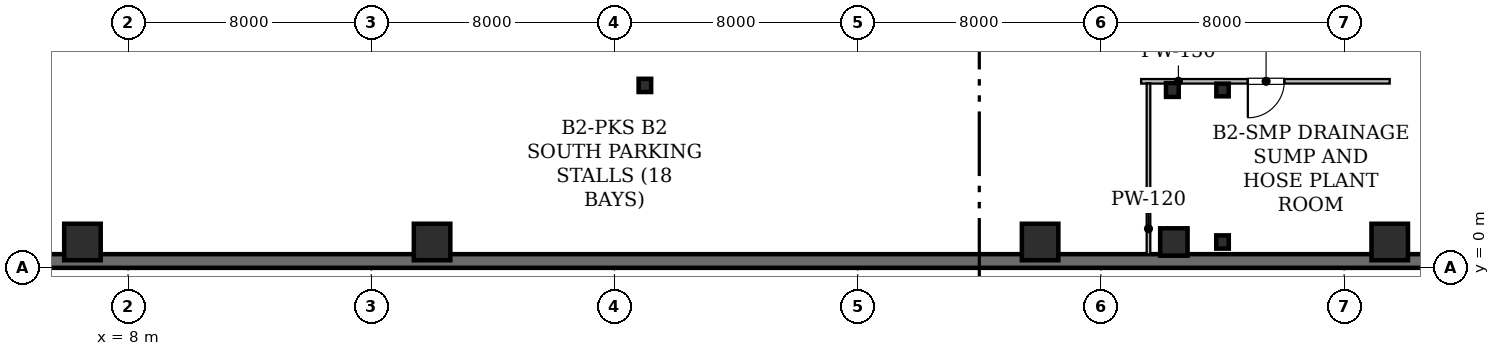
"""IFC4 building model, lengths in metres.
Left out: names, types, materials, properties, quantities, classifications, styles, units other than length and angle.
Written with IfcOpenShell. Run it as: python <this file> out.ifc"""

import sys

from ifc_helpers import new_model, si_unit, direction, frame, frame_2d, origin, origin_2d, place, context, subcontext, project, spatial, rectangle, hollow_rectangle, i_section, extrude, element, fill, save


model = new_model("IFC4")
c1 = context("Model", 3, precision=1e-05, world=origin(), true_north=direction((0.0, 1.0)))
c2 = subcontext(c1, "Body", "Model", "MODEL_VIEW")
j1 = project(units=[si_unit("LENGTHUNIT", "METRE"), si_unit("PLANEANGLEUNIT", "RADIAN")], contexts=[c1])
p1 = place(None, origin())
s1 = spatial("IfcSite", under=j1, at=p1, CompositionType="ELEMENT")
p2 = place(p1, origin())
s2 = spatial("IfcBuilding", under=s1, at=p2, CompositionType="ELEMENT")
p3 = place(p2, frame((0.0, 0.0, -9.0)))
s3 = spatial("IfcBuildingStorey", under=s2, at=p3, CompositionType="ELEMENT", Elevation=-9.0)
for number, where, z_axis, x_axis in (
    (1, (6.5, 0.85, 0.0), (0.0, 0.0, 1.0), (1.0, 0.0, 0.0)),
    (2, (18.0, 0.85, 0.0), (0.0, 0.0, 1.0), (1.0, 0.0, 0.0)),
    (3, (38.0, 0.85, 0.0), (0.0, 0.0, 1.0), (1.0, 0.0, 0.0)),
    (4, (49.5, 0.85, 0.0), (0.0, 0.0, 1.0), (1.0, 0.0, 0.0)),
):
    element("IfcColumn", number, at=place(p3, frame(where, z_axis=z_axis, x_axis=x_axis)), inside=s3, PredefinedType="COLUMN", context=c2, shape_type="SweptSolid", body=[
        extrude(hollow_rectangle(XDim=1.2, YDim=1.2, WallThickness=0.06, at=origin_2d()), origin(), (0.0, 0.0, 1.0), 4.5),
    ])
p4 = place(p3, frame((25.0, 6.0, 0.0), z_axis=(0.0, 0.0, 1.0), x_axis=(1.0, 0.0, 0.0)))
e5 = element("IfcColumn", 5, at=p4, inside=s3, PredefinedType="COLUMN", context=c2, shape_type="SweptSolid", body=[
    extrude(i_section(OverallWidth=0.412, OverallDepth=0.435, WebThickness=0.031, FlangeThickness=0.051, FilletRadius=0.015, at=origin_2d()), origin(), (0.0, 0.0, 1.0), 4.5),
])
p5 = place(p3, frame((42.4, 0.85, 0.0), z_axis=(0.0, 0.0, 1.0), x_axis=(1.0, 0.0, 0.0)))
e6 = element("IfcColumn", 6, at=p5, inside=s3, PredefinedType="COLUMN", context=c2, shape_type="SweptSolid", body=[
    extrude(hollow_rectangle(XDim=0.9, YDim=0.9, WallThickness=0.045, at=origin_2d()), origin(), (0.0, 0.0, 1.0), 4.5),
])
p6 = place(p3, frame((42.35, 5.85, 0.0), z_axis=(0.0, 0.0, 1.0), x_axis=(1.0, 0.0, 0.0)))
e7 = element("IfcColumn", 7, at=p6, inside=s3, PredefinedType="COLUMN", context=c2, shape_type="SweptSolid", body=[
    extrude(i_section(OverallWidth=0.418, OverallDepth=0.455, WebThickness=0.037, FlangeThickness=0.06, FilletRadius=0.015, at=origin_2d()), origin(), (0.0, 0.0, 1.0), 4.5),
])
p7 = place(p3, frame((44.0, 0.85, 0.0), z_axis=(0.0, 0.0, 1.0), x_axis=(1.0, 0.0, 0.0)))
e8 = element("IfcColumn", 8, at=p7, inside=s3, PredefinedType="COLUMN", context=c2, shape_type="SweptSolid", body=[
    extrude(i_section(OverallWidth=0.412, OverallDepth=0.435, WebThickness=0.031, FlangeThickness=0.051, FilletRadius=0.015, at=origin_2d()), origin(), (0.0, 0.0, 1.0), 4.5),
])
p8 = place(p3, frame((44.0, 5.85, 0.0), z_axis=(0.0, 0.0, 1.0), x_axis=(1.0, 0.0, 0.0)))
e9 = element("IfcColumn", 9, at=p8, inside=s3, PredefinedType="COLUMN", context=c2, shape_type="SweptSolid", body=[
    extrude(i_section(OverallWidth=0.406, OverallDepth=0.416, WebThickness=0.026, FlangeThickness=0.042, FilletRadius=0.015, at=origin_2d()), origin(), (0.0, 0.0, 1.0), 4.5),
])
p9 = place(p3, frame((50.755, 0.225, 0.0), z_axis=(0.0, 0.0, 1.0), x_axis=(-1.0, 0.0, 0.0)))
e10 = element("IfcWall", 10, at=p9, inside=s3, PredefinedType="USERDEFINED", context=c2, shape_type="SweptSolid", body=[
    extrude(rectangle(XDim=45.513, YDim=0.45, at=frame_2d((22.756, 0.0))), origin(), (0.0, 0.0, 1.0), 4.18),
])
p10 = place(p3, frame((49.5, 6.135, 0.0), z_axis=(0.0, 0.0, 1.0), x_axis=(-1.0, 0.0, 0.0)))
e11 = element("IfcWall", 11, at=p10, inside=s3, PredefinedType="STANDARD", context=c2, shape_type="SweptSolid", body=[
    extrude(rectangle(XDim=8.178, YDim=0.15, at=frame_2d((4.089, 0.0))), origin(), (0.0, 0.0, 1.0), 3.315),
])
p11 = place(p10, frame((3.467, 0.0, 0.0)))
e12 = element("IfcOpeningElement", 12, at=p11, cuts=e11, PredefinedType="OPENING", context=c2, shape_type="SweptSolid", body=[
    extrude(rectangle(XDim=1.2, YDim=2.15, at=frame_2d((0.6, 1.075))), frame((0.0, 0.085, 0.0), z_axis=(0.0, -1.0, 0.0), x_axis=(1.0, 0.0, 0.0)), (0.0, 0.0, 1.0), 0.17),
])
p12 = place(p3, frame((41.565, 6.068, 0.0), z_axis=(0.0, 0.0, 1.0), x_axis=(0.0, -1.0, 0.0)))
e13 = element("IfcWall", 13, at=p12, inside=s3, PredefinedType="PARTITIONING", context=c2, shape_type="SweptSolid", body=[
    extrude(rectangle(XDim=5.626, YDim=0.12, at=frame_2d((2.813, 0.0))), origin(), (0.0, 0.0, 1.0), 3.553),
])
p13 = place(p11, origin())
e14 = element("IfcDoor", 14, at=p13, inside=s3, OperationType="SINGLE_SWING_RIGHT", PredefinedType="DOOR", context=c2, shape_type="SweptSolid", body=[
    extrude(rectangle(XDim=1.2, YDim=2.15, at=frame_2d((0.6, 1.075))), frame((0.0, 0.025, 0.0), z_axis=(0.0, -1.0, 0.0), x_axis=(1.0, 0.0, 0.0)), (0.0, 0.0, 1.0), 0.05),
])
fill(e12, e14)
save(model, sys.argv[1])
